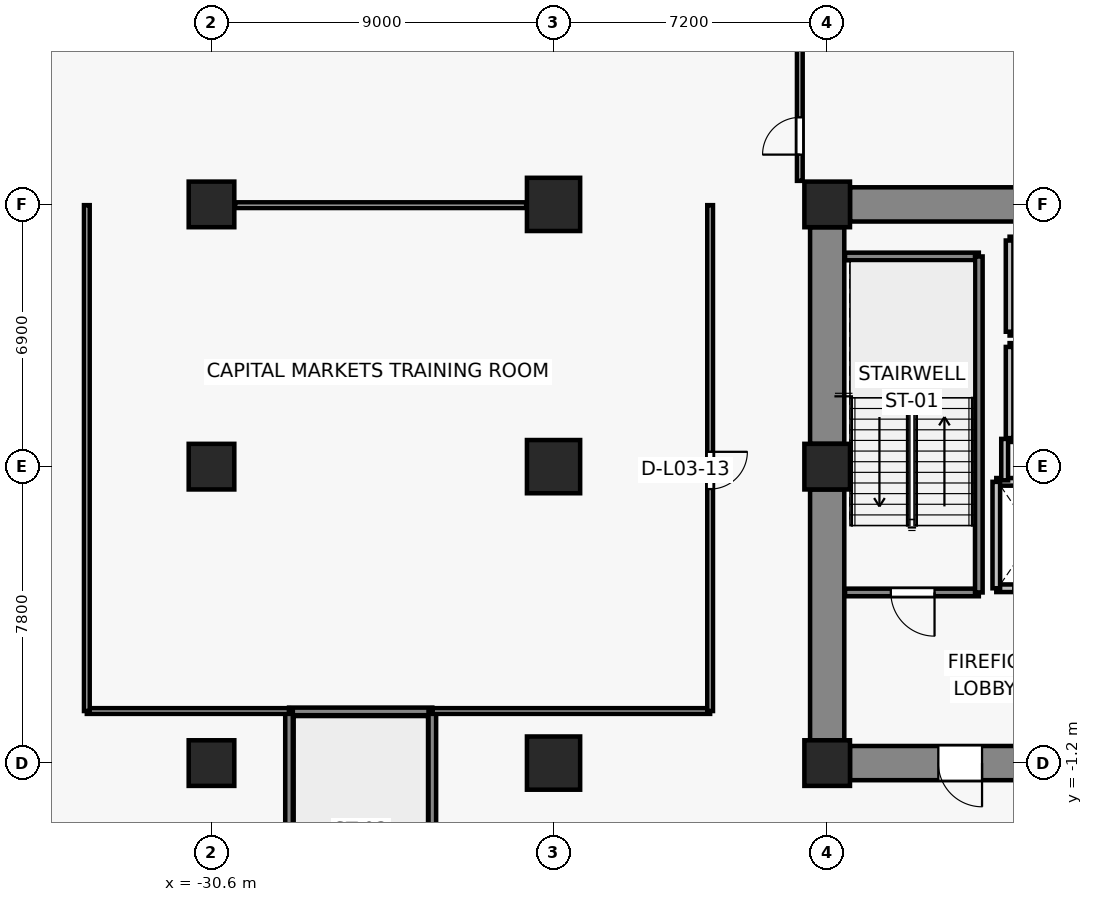
"""IFC4 building model, lengths in metres.
Left out: names, types, materials, properties, quantities, classifications, styles, units other than length and angle.
Written with IfcOpenShell. Run it as: python <this file> out.ifc"""

import sys

from ifc_helpers import new_model, si_unit, direction, frame, frame_2d, origin, origin_2d, place, context, subcontext, project, spatial, rectangle, extrude, source, transform, mapped, element, fill, save


model = new_model("IFC4")
c1 = context("Model", 3, precision=1e-05, world=origin(), true_north=direction((0.0, 1.0)))
c2 = subcontext(c1, "Body", "Model", "MODEL_VIEW")
j1 = project(units=[si_unit("LENGTHUNIT", "METRE"), si_unit("PLANEANGLEUNIT", "RADIAN")], contexts=[c1])
p1 = place(None, origin())
s1 = spatial("IfcSite", under=j1, at=p1, CompositionType="ELEMENT")
p2 = place(p1, origin())
s2 = spatial("IfcBuilding", under=s1, at=p2, CompositionType="ELEMENT")
p3 = place(p2, frame((0.0, 0.0, 13.8)))
s3 = spatial("IfcBuildingStorey", under=s2, at=p3, CompositionType="ELEMENT", Elevation=13.8)
for number, where, z_axis, x_axis in (
    (1, (-14.4, -1.2, 0.0), (0.0, 0.0, 1.0), (1.0, 0.0, 0.0)),
    (2, (-14.4, 6.6, 0.0), (0.0, 0.0, 1.0), (1.0, 0.0, 0.0)),
    (3, (-14.4, 13.5, 0.0), (0.0, 0.0, 1.0), (1.0, 0.0, 0.0)),
):
    element("IfcColumn", number, at=place(p3, frame(where, z_axis=z_axis, x_axis=x_axis)), inside=s3, PredefinedType="COLUMN", context=c2, shape_type="SweptSolid", body=[
        extrude(rectangle(XDim=1.2, YDim=1.2, at=origin_2d()), origin(), (0.0, 0.0, 1.0), 4.4),
    ])
for number, where, z_axis, x_axis in (
    (4, (-21.6, -1.2, 0.0), (0.0, 0.0, 1.0), (1.0, 0.0, 0.0)),
    (5, (-21.6, 6.6, 0.0), (0.0, 0.0, 1.0), (1.0, 0.0, 0.0)),
    (6, (-21.6, 13.5, 0.0), (0.0, 0.0, 1.0), (1.0, 0.0, 0.0)),
):
    element("IfcColumn", number, at=place(p3, frame(where, z_axis=z_axis, x_axis=x_axis)), inside=s3, PredefinedType="COLUMN", context=c2, shape_type="SweptSolid", body=[
        extrude(rectangle(XDim=1.4, YDim=1.4, at=origin_2d()), origin(), (0.0, 0.0, 1.0), 4.4),
    ])
for number, where, z_axis, x_axis in (
    (7, (-30.6, -1.2, 0.0), (0.0, 0.0, 1.0), (1.0, 0.0, 0.0)),
    (8, (-30.6, 6.6, 0.0), (0.0, 0.0, 1.0), (1.0, 0.0, 0.0)),
    (9, (-30.6, 13.5, 0.0), (0.0, 0.0, 1.0), (1.0, 0.0, 0.0)),
):
    element("IfcColumn", number, at=place(p3, frame(where, z_axis=z_axis, x_axis=x_axis)), inside=s3, PredefinedType="COLUMN", context=c2, shape_type="SweptSolid", body=[
        extrude(rectangle(XDim=1.2, YDim=1.2, at=origin_2d()), origin(), (0.0, 0.0, 1.0), 4.4),
    ])
p4 = place(p3, frame((-13.8, 13.5, 0.0), z_axis=(0.0, 0.0, 1.0), x_axis=(1.0, 0.0, 0.0)))
e10 = element("IfcWall", 10, at=p4, inside=s3, PredefinedType="SHEAR", context=c2, shape_type="SweptSolid", body=[
    extrude(rectangle(XDim=6.0, YDim=0.9, at=frame_2d((3.0, 0.0))), origin(), (0.0, 0.0, 1.0), 4.1),
])
p5 = place(p3, frame((-14.4, -0.6, 0.0), z_axis=(0.0, 0.0, 1.0), x_axis=(0.0, 1.0, 0.0)))
e11 = element("IfcWall", 11, at=p5, inside=s3, PredefinedType="SHEAR", context=c2, shape_type="SweptSolid", body=[
    extrude(rectangle(XDim=6.6, YDim=0.9, at=frame_2d((3.3, 0.0))), origin(), (0.0, 0.0, 1.0), 4.1),
])
p6 = place(p3, frame((-14.4, 7.2, 0.0), z_axis=(0.0, 0.0, 1.0), x_axis=(0.0, 1.0, 0.0)))
e12 = element("IfcWall", 12, at=p6, inside=s3, PredefinedType="SHEAR", context=c2, shape_type="SweptSolid", body=[
    extrude(rectangle(XDim=5.7, YDim=0.9, at=frame_2d((2.85, 0.0))), origin(), (0.0, 0.0, 1.0), 4.1),
])
p7 = place(p3, frame((-7.8, -1.2, 0.0), z_axis=(0.0, 0.0, 1.0), x_axis=(-1.0, 0.0, 0.0)))
e13 = element("IfcWall", 13, at=p7, inside=s3, PredefinedType="SHEAR", context=c2, shape_type="SweptSolid", body=[
    extrude(rectangle(XDim=6.0, YDim=0.9, at=frame_2d((3.0, 0.0))), origin(), (0.0, 0.0, 1.0), 4.1),
])
p8 = place(p7, frame((2.525, 0.0, 0.0)))
e14 = element("IfcOpeningElement", 14, at=p8, cuts=e13, PredefinedType="OPENING", context=c2, shape_type="SweptSolid", body=[
    extrude(rectangle(XDim=1.15, YDim=2.15, at=frame_2d((0.575, 1.075))), frame((0.0, 0.46, 0.0), z_axis=(0.0, -1.0, 0.0), x_axis=(1.0, 0.0, 0.0)), (0.0, 0.0, 1.0), 0.92),
])
p9 = place(p3, frame((-7.95, 3.4, 0.0), z_axis=(0.0, 0.0, 1.0), x_axis=(-1.0, 0.0, 0.0)))
e15 = element("IfcWall", 15, at=p9, inside=s3, PredefinedType="SOLIDWALL", context=c2, shape_type="SweptSolid", body=[
    extrude(rectangle(XDim=2.0, YDim=0.2, at=frame_2d((1.0, 0.0))), origin(), (0.0, 0.0, 1.0), 4.1),
])
p10 = place(p9, frame((0.45, 0.0, 0.0)))
e16 = element("IfcOpeningElement", 16, at=p10, cuts=e15, PredefinedType="OPENING", context=c2, shape_type="SweptSolid", body=[
    extrude(rectangle(XDim=1.1, YDim=2.2, at=frame_2d((0.55, 1.1))), frame((0.0, 0.11, 0.0), z_axis=(0.0, -1.0, 0.0), x_axis=(1.0, 0.0, 0.0)), (0.0, 0.0, 1.0), 0.22),
])
p11 = place(p3, frame((-9.95, 6.2, 0.0), z_axis=(0.0, 0.0, 1.0), x_axis=(1.0, 0.0, 0.0)))
e17 = element("IfcWall", 17, at=p11, inside=s3, PredefinedType="SOLIDWALL", context=c2, shape_type="SweptSolid", body=[
    extrude(rectangle(XDim=2.0, YDim=0.2, at=frame_2d((1.0, 0.0))), origin(), (0.0, 0.0, 1.0), 4.1),
])
p12 = place(p3, frame((-9.95, 3.4, 0.0), z_axis=(0.0, 0.0, 1.0), x_axis=(0.0, 1.0, 0.0)))
e18 = element("IfcWall", 18, at=p12, inside=s3, PredefinedType="SOLIDWALL", context=c2, shape_type="SweptSolid", body=[
    extrude(rectangle(XDim=2.8, YDim=0.2, at=frame_2d((1.4, 0.0))), origin(), (0.0, 0.0, 1.0), 4.1),
])
for number, where, z_axis, x_axis in (
    (19, (-7.4, 7.35, 0.0), (0.0, 0.0, 1.0), (-1.0, 0.0, 0.0)),
    (20, (-9.6, 9.75, 0.0), (0.0, 0.0, 1.0), (1.0, 0.0, 0.0)),
):
    element("IfcWall", number, at=place(p3, frame(where, z_axis=z_axis, x_axis=x_axis)), inside=s3, PredefinedType="SOLIDWALL", context=c2, shape_type="SweptSolid", body=[
        extrude(rectangle(XDim=2.2, YDim=0.2, at=frame_2d((1.1, 0.0))), origin(), (0.0, 0.0, 1.0), 3.19),
    ])
p13 = place(p3, frame((-9.6, 7.35, 0.0), z_axis=(0.0, 0.0, 1.0), x_axis=(0.0, 1.0, 0.0)))
e21 = element("IfcWall", 21, at=p13, inside=s3, PredefinedType="SOLIDWALL", context=c2, shape_type="SweptSolid", body=[
    extrude(rectangle(XDim=2.4, YDim=0.2, at=frame_2d((1.2, 0.0))), origin(), (0.0, 0.0, 1.0), 4.1),
])
for number, where, z_axis, x_axis in (
    (22, (-7.4, 10.15, 0.0), (0.0, 0.0, 1.0), (-1.0, 0.0, 0.0)),
    (23, (-9.6, 12.55, 0.0), (0.0, 0.0, 1.0), (1.0, 0.0, 0.0)),
):
    element("IfcWall", number, at=place(p3, frame(where, z_axis=z_axis, x_axis=x_axis)), inside=s3, PredefinedType="SOLIDWALL", context=c2, shape_type="SweptSolid", body=[
        extrude(rectangle(XDim=2.2, YDim=0.2, at=frame_2d((1.1, 0.0))), origin(), (0.0, 0.0, 1.0), 3.19),
    ])
p14 = place(p3, frame((-9.6, 10.15, 0.0), z_axis=(0.0, 0.0, 1.0), x_axis=(0.0, 1.0, 0.0)))
e24 = element("IfcWall", 24, at=p14, inside=s3, PredefinedType="SOLIDWALL", context=c2, shape_type="SweptSolid", body=[
    extrude(rectangle(XDim=2.4, YDim=0.2, at=frame_2d((1.2, 0.0))), origin(), (0.0, 0.0, 1.0), 4.1),
])
p15 = place(p3, frame((-10.41, 3.29, 0.0), z_axis=(0.0, 0.0, 1.0), x_axis=(-1.0, 0.0, 0.0)))
e25 = element("IfcWall", 25, at=p15, inside=s3, PredefinedType="SOLIDWALL", context=c2, shape_type="SweptSolid", body=[
    extrude(rectangle(XDim=3.52, YDim=0.2, at=frame_2d((1.76, 0.0))), origin(), (0.0, 0.0, 1.0), 4.1),
])
p16 = place(p15, frame((1.165, 0.0, 0.0)))
e26 = element("IfcOpeningElement", 26, at=p16, cuts=e25, PredefinedType="OPENING", context=c2, shape_type="SweptSolid", body=[
    extrude(rectangle(XDim=1.15, YDim=2.15, at=frame_2d((0.575, 1.075))), frame((0.0, 0.11, 0.0), z_axis=(0.0, -1.0, 0.0), x_axis=(1.0, 0.0, 0.0)), (0.0, 0.0, 1.0), 0.22),
])
p17 = place(p3, frame((-13.93, 12.13, 0.0), z_axis=(0.0, 0.0, 1.0), x_axis=(1.0, 0.0, 0.0)))
e27 = element("IfcWall", 27, at=p17, inside=s3, PredefinedType="SOLIDWALL", context=c2, shape_type="SweptSolid", body=[
    extrude(rectangle(XDim=3.52, YDim=0.2, at=frame_2d((1.76, 0.0))), origin(), (0.0, 0.0, 1.0), 4.1),
])
p18 = place(p3, frame((-10.41, 12.13, 0.0), z_axis=(0.0, 0.0, 1.0), x_axis=(0.0, -1.0, 0.0)))
e28 = element("IfcWall", 28, at=p18, inside=s3, PredefinedType="SOLIDWALL", context=c2, shape_type="SweptSolid", body=[
    extrude(rectangle(XDim=8.84, YDim=0.2, at=frame_2d((4.42, 0.0))), origin(), (0.0, 0.0, 1.0), 4.1),
])
p19 = place(p3, frame((-9.73, 6.24, 0.0), z_axis=(0.0, 0.0, 1.0), x_axis=(0.0, 1.0, 0.0)))
e29 = element("IfcWall", 29, at=p19, inside=s3, PredefinedType="PARTITIONING", context=c2, shape_type="SweptSolid", body=[
    extrude(rectangle(XDim=1.09, YDim=0.18, at=frame_2d((0.545, 0.0))), origin(), (0.0, 0.0, 1.0), 4.1),
])
p20 = place(p3, frame((-28.56, 0.16, 0.0), z_axis=(0.0, 0.0, 1.0), x_axis=(1.0, 0.0, 0.0)))
e30 = element("IfcWall", 30, at=p20, inside=s3, PredefinedType="SOLIDWALL", context=c2, shape_type="SweptSolid", body=[
    extrude(rectangle(XDim=3.77, YDim=0.2, at=frame_2d((1.885, 0.0))), origin(), (0.0, 0.0, 1.0), 4.1),
])
for number, where, z_axis, x_axis in (
    (31, (-28.56, -8.76, 0.0), (0.0, 0.0, 1.0), (0.0, 1.0, 0.0)),
    (32, (-24.79, 0.16, 0.0), (0.0, 0.0, 1.0), (0.0, -1.0, 0.0)),
):
    element("IfcWall", number, at=place(p3, frame(where, z_axis=z_axis, x_axis=x_axis)), inside=s3, PredefinedType="SOLIDWALL", context=c2, shape_type="SweptSolid", body=[
        extrude(rectangle(XDim=8.92, YDim=0.2, at=frame_2d((4.46, 0.0))), origin(), (0.0, 0.0, 1.0), 4.1),
    ])
p21 = place(p3, frame((-28.56, 0.17, 0.0), z_axis=(0.0, 0.0, 1.0), x_axis=(-1.0, 0.0, 0.0)))
e33 = element("IfcWall", 33, at=p21, inside=s3, PredefinedType="PARTITIONING", context=c2, shape_type="SweptSolid", body=[
    extrude(rectangle(XDim=5.32, YDim=0.15, at=frame_2d((2.66, 0.0))), origin(), (0.0, 0.0, 1.0), 3.19),
])
p22 = place(p3, frame((-17.48, 0.17, 0.0), z_axis=(0.0, 0.0, 1.0), x_axis=(-1.0, 0.0, 0.0)))
e34 = element("IfcWall", 34, at=p22, inside=s3, PredefinedType="PARTITIONING", context=c2, shape_type="SweptSolid", body=[
    extrude(rectangle(XDim=7.31, YDim=0.15, at=frame_2d((3.655, 0.0))), origin(), (0.0, 0.0, 1.0), 3.19),
])
p23 = place(p3, frame((-29.98, 13.48, 0.0), z_axis=(0.0, 0.0, 1.0), x_axis=(1.0, 0.0, 0.0)))
e35 = element("IfcWall", 35, at=p23, inside=s3, PredefinedType="PARTITIONING", context=c2, shape_type="SweptSolid", body=[
    extrude(rectangle(XDim=7.66, YDim=0.15, at=frame_2d((3.83, 0.0))), origin(), (0.0, 0.0, 1.0), 3.19),
])
p24 = place(p3, frame((-33.88, 0.17, 0.0), z_axis=(0.0, 0.0, 1.0), x_axis=(0.0, 1.0, 0.0)))
e36 = element("IfcWall", 36, at=p24, inside=s3, PredefinedType="PARTITIONING", context=c2, shape_type="SweptSolid", body=[
    extrude(rectangle(XDim=13.31, YDim=0.15, at=frame_2d((6.655, 0.0))), origin(), (0.0, 0.0, 1.0), 4.1),
])
p25 = place(p3, frame((-17.48, 13.48, 0.0), z_axis=(0.0, 0.0, 1.0), x_axis=(0.0, -1.0, 0.0)))
e37 = element("IfcWall", 37, at=p25, inside=s3, PredefinedType="PARTITIONING", context=c2, shape_type="SweptSolid", body=[
    extrude(rectangle(XDim=13.31, YDim=0.15, at=frame_2d((6.655, 0.0))), origin(), (0.0, 0.0, 1.0), 3.19),
])
p26 = place(p25, frame((6.49, 0.0, 0.0)))
e38 = element("IfcOpeningElement", 38, at=p26, cuts=e37, PredefinedType="OPENING", context=c2, shape_type="SweptSolid", body=[
    extrude(rectangle(XDim=0.98, YDim=2.15, at=frame_2d((0.49, 1.075))), frame((0.0, 0.085, 0.0), z_axis=(0.0, -1.0, 0.0), x_axis=(1.0, 0.0, 0.0)), (0.0, 0.0, 1.0), 0.17),
])
p27 = place(p3, frame((-15.12, 14.12, 0.0), z_axis=(0.0, 0.0, 1.0), x_axis=(0.0, 1.0, 0.0)))
e39 = element("IfcWall", 39, at=p27, inside=s3, PredefinedType="PARTITIONING", context=c2, shape_type="SweptSolid", body=[
    extrude(rectangle(XDim=6.96, YDim=0.15, at=frame_2d((3.48, 0.0))), origin(), (0.0, 0.0, 1.0), 3.473),
])
p28 = place(p27, frame((0.69, 0.0, 0.0)))
e40 = element("IfcOpeningElement", 40, at=p28, cuts=e39, PredefinedType="OPENING", context=c2, shape_type="SweptSolid", body=[
    extrude(rectangle(XDim=0.98, YDim=2.15, at=frame_2d((0.49, 1.075))), frame((0.0, 0.085, 0.0), z_axis=(0.0, -1.0, 0.0), x_axis=(1.0, 0.0, 0.0)), (0.0, 0.0, 1.0), 0.17),
])
m1 = source(origin(), c2, "Body", "SweptSolid", [
    extrude(rectangle(XDim=1.15, YDim=2.15, at=frame_2d((0.575, 1.075))), frame((0.0, 0.025, 0.0), z_axis=(0.0, -1.0, 0.0), x_axis=(1.0, 0.0, 0.0)), (0.0, 0.0, 1.0), 0.05),
])
p29 = place(p16, origin())
e41 = element("IfcDoor", 41, at=p29, inside=s3, OperationType="SINGLE_SWING_LEFT", PredefinedType="DOOR", context=c2, shape_type="MappedRepresentation", body=[
    mapped(m1, transform((0.0, 0.0, 0.0), x_axis=(1.0, 0.0, 0.0), y_axis=(0.0, 1.0, 0.0), z_axis=(0.0, 0.0, 1.0), scale=1.0)),
])
fill(e26, e41)
p30 = place(p8, origin())
e42 = element("IfcDoor", 42, at=p30, inside=s3, OperationType="SINGLE_SWING_LEFT", PredefinedType="DOOR", context=c2, shape_type="MappedRepresentation", body=[
    mapped(m1, transform((0.0, 0.0, 0.0), x_axis=(1.0, 0.0, 0.0), y_axis=(0.0, 1.0, 0.0), z_axis=(0.0, 0.0, 1.0), scale=1.0)),
])
fill(e14, e42)
m2 = source(origin(), c2, "Body", "SweptSolid", [
    extrude(rectangle(XDim=0.98, YDim=2.15, at=frame_2d((0.49, 1.075))), frame((0.0, 0.025, 0.0), z_axis=(0.0, -1.0, 0.0), x_axis=(1.0, 0.0, 0.0)), (0.0, 0.0, 1.0), 0.05),
])
p31 = place(p26, origin())
e43 = element("IfcDoor", 43, at=p31, inside=s3, OperationType="SINGLE_SWING_LEFT", PredefinedType="DOOR", context=c2, shape_type="MappedRepresentation", body=[
    mapped(m2, transform((0.0, 0.0, 0.0), x_axis=(1.0, 0.0, 0.0), y_axis=(0.0, 1.0, 0.0), z_axis=(0.0, 0.0, 1.0), scale=1.0)),
])
fill(e38, e43)
p32 = place(p28, origin())
e44 = element("IfcDoor", 44, at=p32, inside=s3, OperationType="SINGLE_SWING_LEFT", PredefinedType="DOOR", context=c2, shape_type="MappedRepresentation", body=[
    mapped(m2, transform((0.0, 0.0, 0.0), x_axis=(1.0, 0.0, 0.0), y_axis=(0.0, 1.0, 0.0), z_axis=(0.0, 0.0, 1.0), scale=1.0)),
])
fill(e40, e44)
save(model, sys.argv[1])
